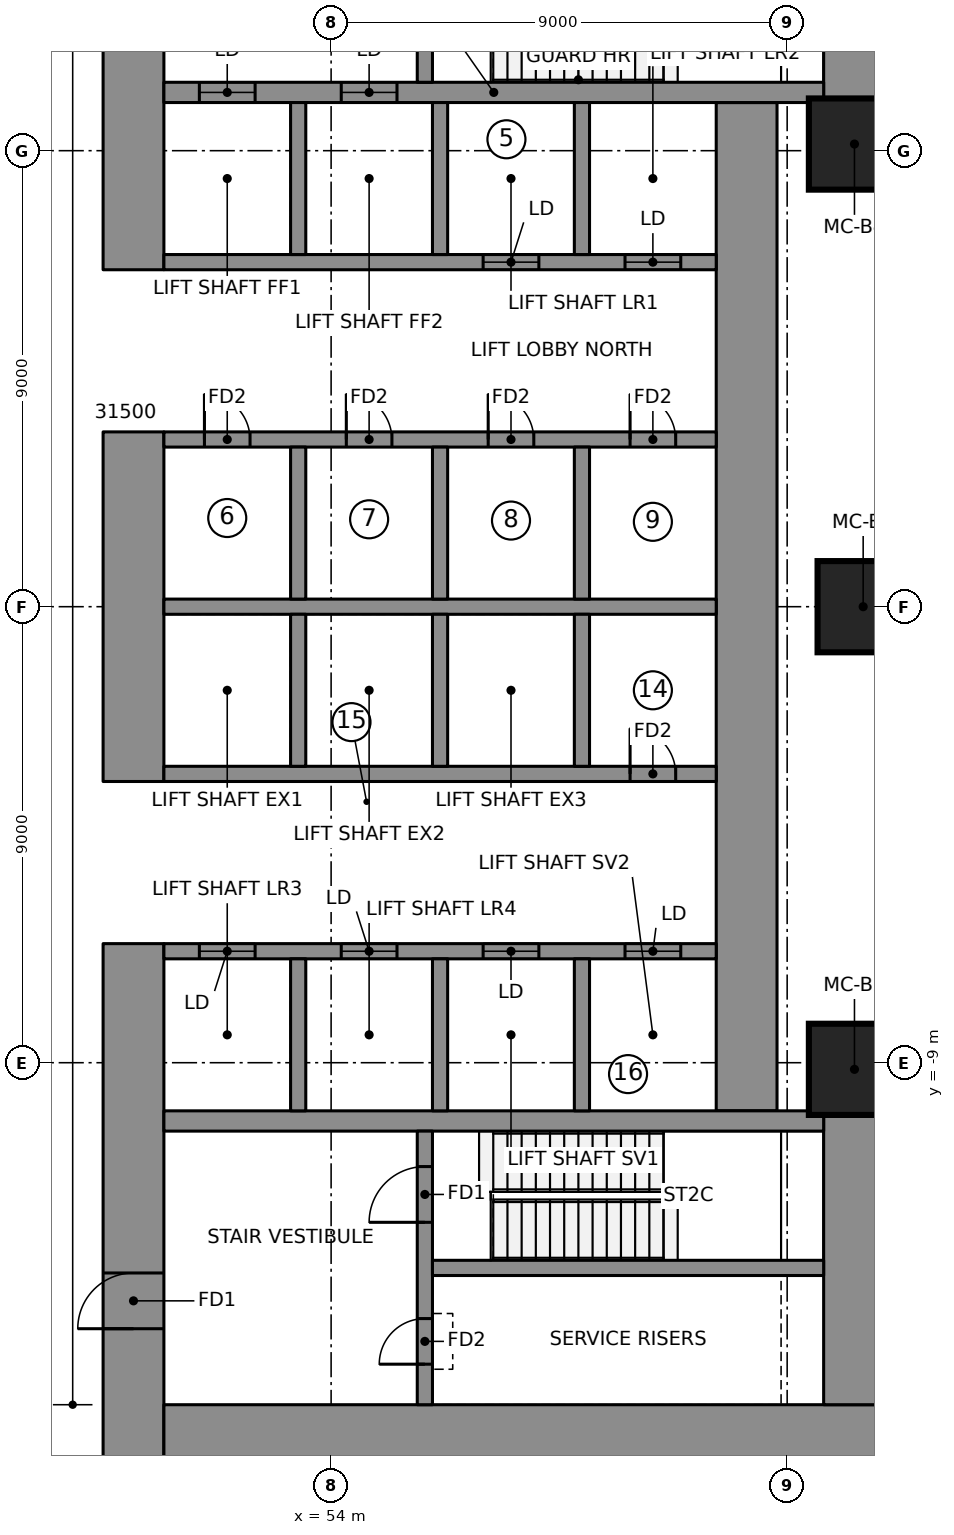
"""IFC4 building model, lengths in metres.
Left out: names, types, materials, properties, quantities, classifications, styles, units other than length and angle.
Written with IfcOpenShell. Run it as: python <this file> out.ifc"""

import sys

from ifc_helpers import new_model, si_unit, direction, frame, frame_2d, origin, origin_2d, place, context, subcontext, project, spatial, rectangle, extrude, element, fill, save


model = new_model("IFC4")
c1 = context("Model", 3, precision=1e-05, world=origin(), true_north=direction((0.0, 1.0)))
c2 = subcontext(c1, "Body", "Model", "MODEL_VIEW")
j1 = project(units=[si_unit("LENGTHUNIT", "METRE"), si_unit("PLANEANGLEUNIT", "RADIAN")], contexts=[c1])
p1 = place(None, origin())
s1 = spatial("IfcSite", under=j1, at=p1, CompositionType="ELEMENT")
p2 = place(p1, origin())
s2 = spatial("IfcBuilding", under=s1, at=p2, CompositionType="ELEMENT")
p3 = place(p2, frame((0.0, 0.0, 35.0)))
s3 = spatial("IfcBuildingStorey", under=s2, at=p3, CompositionType="ELEMENT", Elevation=35.0)
p4 = place(p3, frame((50.1, 6.65, 0.0), z_axis=(0.0, 0.0, 1.0), x_axis=(0.0, 1.0, 0.0)))
e1 = element("IfcWall", 1, at=p4, inside=s3, PredefinedType="SHEAR", context=c2, shape_type="SweptSolid", body=[
    extrude(rectangle(XDim=10.3, YDim=1.2, at=frame_2d((5.15, 0.0))), origin(), (0.0, 0.0, 1.0), 4.6),
])
p5 = place(p4, frame((6.5, 0.0, 0.0)))
e2 = element("IfcOpeningElement", 2, at=p5, cuts=e1, PredefinedType="OPENING", context=c2, shape_type="SweptSolid", body=[
    extrude(rectangle(XDim=1.1, YDim=2.1, at=frame_2d((0.55, 1.05))), frame((0.0, 0.61, 0.0), z_axis=(0.0, -1.0, 0.0), x_axis=(1.0, 0.0, 0.0)), (0.0, 0.0, 1.0), 1.22),
])
p6 = place(p3, frame((50.1, -3.45, 0.0), z_axis=(0.0, 0.0, 1.0), x_axis=(0.0, 1.0, 0.0)))
e3 = element("IfcWall", 3, at=p6, inside=s3, PredefinedType="SHEAR", context=c2, shape_type="SweptSolid", body=[
    extrude(rectangle(XDim=6.9, YDim=1.2, at=frame_2d((3.45, 0.0))), origin(), (0.0, 0.0, 1.0), 4.6),
])
p7 = place(p3, frame((50.1, -16.95, 0.0), z_axis=(0.0, 0.0, 1.0), x_axis=(0.0, 1.0, 0.0)))
e4 = element("IfcWall", 4, at=p7, inside=s3, PredefinedType="SHEAR", context=c2, shape_type="SweptSolid", body=[
    extrude(rectangle(XDim=10.3, YDim=1.2, at=frame_2d((5.15, 0.0))), origin(), (0.0, 0.0, 1.0), 4.6),
])
p8 = place(p7, frame((2.7, 0.0, 0.0)))
e5 = element("IfcOpeningElement", 5, at=p8, cuts=e4, PredefinedType="OPENING", context=c2, shape_type="SweptSolid", body=[
    extrude(rectangle(XDim=1.1, YDim=2.1, at=frame_2d((0.55, 1.05))), frame((0.0, 0.61, 0.0), z_axis=(0.0, -1.0, 0.0), x_axis=(1.0, 0.0, 0.0)), (0.0, 0.0, 1.0), 1.22),
])
p9 = place(p3, frame((50.7, -16.35, 0.0), z_axis=(0.0, 0.0, 1.0), x_axis=(1.0, 0.0, 0.0)))
e6 = element("IfcWall", 6, at=p9, inside=s3, PredefinedType="SHEAR", context=c2, shape_type="SweptSolid", body=[
    extrude(rectangle(XDim=14.22, YDim=1.2, at=frame_2d((7.11, 0.0))), origin(), (0.0, 0.0, 1.0), 4.6),
])
for number, where, z_axis, x_axis in (
    (7, (64.32, 9.95, 0.0), (0.0, 0.0, 1.0), (0.0, 1.0, 0.0)),
    (8, (64.32, -15.75, 0.0), (0.0, 0.0, 1.0), (0.0, 1.0, 0.0)),
):
    element("IfcWall", number, at=place(p3, frame(where, z_axis=z_axis, x_axis=x_axis)), inside=s3, PredefinedType="SHEAR", context=c2, shape_type="SweptSolid", body=[
        extrude(rectangle(XDim=5.8, YDim=1.2, at=frame_2d((2.9, 0.0))), origin(), (0.0, 0.0, 1.0), 4.6),
    ])
p10 = place(p3, frame((62.2, -9.95, 0.0), z_axis=(0.0, 0.0, 1.0), x_axis=(0.0, 1.0, 0.0)))
e9 = element("IfcWall", 9, at=p10, inside=s3, PredefinedType="SHEAR", context=c2, shape_type="SweptSolid", body=[
    extrude(rectangle(XDim=19.9, YDim=1.2, at=frame_2d((9.95, 0.0))), origin(), (0.0, 0.0, 1.0), 4.6),
])
p11 = place(p3, frame((50.7, 10.15, 0.0), z_axis=(0.0, 0.0, 1.0), x_axis=(1.0, 0.0, 0.0)))
e10 = element("IfcWall", 10, at=p11, inside=s3, PredefinedType="SHEAR", context=c2, shape_type="SweptSolid", body=[
    extrude(rectangle(XDim=13.02, YDim=0.4, at=frame_2d((6.51, 0.0))), origin(), (0.0, 0.0, 1.0), 4.6),
])
p12 = place(p11, frame((0.7, 0.0, 0.0)))
e11 = element("IfcOpeningElement", 11, at=p12, cuts=e10, PredefinedType="OPENING", context=c2, shape_type="SweptSolid", body=[
    extrude(rectangle(XDim=1.1, YDim=2.1, at=frame_2d((0.55, 1.05))), frame((0.0, 0.21, 0.0), z_axis=(0.0, -1.0, 0.0), x_axis=(1.0, 0.0, 0.0)), (0.0, 0.0, 1.0), 0.42),
])
p13 = place(p11, frame((3.5, 0.0, 0.0)))
e12 = element("IfcOpeningElement", 12, at=p13, cuts=e10, PredefinedType="OPENING", context=c2, shape_type="SweptSolid", body=[
    extrude(rectangle(XDim=1.1, YDim=2.1, at=frame_2d((0.55, 1.05))), frame((0.0, 0.21, 0.0), z_axis=(0.0, -1.0, 0.0), x_axis=(1.0, 0.0, 0.0)), (0.0, 0.0, 1.0), 0.42),
])
p14 = place(p3, frame((50.7, -10.15, 0.0), z_axis=(0.0, 0.0, 1.0), x_axis=(1.0, 0.0, 0.0)))
e13 = element("IfcWall", 13, at=p14, inside=s3, PredefinedType="SHEAR", context=c2, shape_type="SweptSolid", body=[
    extrude(rectangle(XDim=13.02, YDim=0.4, at=frame_2d((6.51, 0.0))), origin(), (0.0, 0.0, 1.0), 4.6),
])
p15 = place(p3, frame((50.7, 0.0, 0.0), z_axis=(0.0, 0.0, 1.0), x_axis=(1.0, 0.0, 0.0)))
e14 = element("IfcWall", 14, at=p15, inside=s3, PredefinedType="SHEAR", context=c2, shape_type="SweptSolid", body=[
    extrude(rectangle(XDim=10.9, YDim=0.3, at=frame_2d((5.45, 0.0))), origin(), (0.0, 0.0, 1.0), 4.6),
])
p16 = place(p3, frame((50.7, 3.3, 0.0), z_axis=(0.0, 0.0, 1.0), x_axis=(1.0, 0.0, 0.0)))
e15 = element("IfcWall", 15, at=p16, inside=s3, PredefinedType="SHEAR", context=c2, shape_type="SweptSolid", body=[
    extrude(rectangle(XDim=10.9, YDim=0.3, at=frame_2d((5.45, 0.0))), origin(), (0.0, 0.0, 1.0), 4.6),
])
p17 = place(p16, frame((0.8, 0.0, 0.0)))
e16 = element("IfcOpeningElement", 16, at=p17, cuts=e15, PredefinedType="OPENING", context=c2, shape_type="SweptSolid", body=[
    extrude(rectangle(XDim=0.9, YDim=2.1, at=frame_2d((0.45, 1.05))), frame((0.0, 0.16, 0.0), z_axis=(0.0, -1.0, 0.0), x_axis=(1.0, 0.0, 0.0)), (0.0, 0.0, 1.0), 0.32),
])
p18 = place(p16, frame((3.6, 0.0, 0.0)))
e17 = element("IfcOpeningElement", 17, at=p18, cuts=e15, PredefinedType="OPENING", context=c2, shape_type="SweptSolid", body=[
    extrude(rectangle(XDim=0.9, YDim=2.1, at=frame_2d((0.45, 1.05))), frame((0.0, 0.16, 0.0), z_axis=(0.0, -1.0, 0.0), x_axis=(1.0, 0.0, 0.0)), (0.0, 0.0, 1.0), 0.32),
])
p19 = place(p16, frame((6.4, 0.0, 0.0)))
e18 = element("IfcOpeningElement", 18, at=p19, cuts=e15, PredefinedType="OPENING", context=c2, shape_type="SweptSolid", body=[
    extrude(rectangle(XDim=0.9, YDim=2.1, at=frame_2d((0.45, 1.05))), frame((0.0, 0.16, 0.0), z_axis=(0.0, -1.0, 0.0), x_axis=(1.0, 0.0, 0.0)), (0.0, 0.0, 1.0), 0.32),
])
p20 = place(p16, frame((9.2, 0.0, 0.0)))
e19 = element("IfcOpeningElement", 19, at=p20, cuts=e15, PredefinedType="OPENING", context=c2, shape_type="SweptSolid", body=[
    extrude(rectangle(XDim=0.9, YDim=2.1, at=frame_2d((0.45, 1.05))), frame((0.0, 0.16, 0.0), z_axis=(0.0, -1.0, 0.0), x_axis=(1.0, 0.0, 0.0)), (0.0, 0.0, 1.0), 0.32),
])
p21 = place(p3, frame((50.7, 6.8, 0.0), z_axis=(0.0, 0.0, 1.0), x_axis=(1.0, 0.0, 0.0)))
e20 = element("IfcWall", 20, at=p21, inside=s3, PredefinedType="SHEAR", context=c2, shape_type="SweptSolid", body=[
    extrude(rectangle(XDim=10.9, YDim=0.3, at=frame_2d((5.45, 0.0))), origin(), (0.0, 0.0, 1.0), 4.6),
])
p22 = place(p21, frame((6.3, 0.0, 0.0)))
e21 = element("IfcOpeningElement", 21, at=p22, cuts=e20, PredefinedType="OPENING", context=c2, shape_type="SweptSolid", body=[
    extrude(rectangle(XDim=1.1, YDim=2.1, at=frame_2d((0.55, 1.05))), frame((0.0, 0.16, 0.0), z_axis=(0.0, -1.0, 0.0), x_axis=(1.0, 0.0, 0.0)), (0.0, 0.0, 1.0), 0.32),
])
p23 = place(p21, frame((9.1, 0.0, 0.0)))
e22 = element("IfcOpeningElement", 22, at=p23, cuts=e20, PredefinedType="OPENING", context=c2, shape_type="SweptSolid", body=[
    extrude(rectangle(XDim=1.1, YDim=2.1, at=frame_2d((0.55, 1.05))), frame((0.0, 0.16, 0.0), z_axis=(0.0, -1.0, 0.0), x_axis=(1.0, 0.0, 0.0)), (0.0, 0.0, 1.0), 0.32),
])
for number, where, z_axis, x_axis in (
    (23, (53.35, 0.15, 0.0), (0.0, 0.0, 1.0), (0.0, 1.0, 0.0)),
    (24, (53.35, 6.95, 0.0), (0.0, 0.0, 1.0), (0.0, 1.0, 0.0)),
    (25, (56.15, 0.15, 0.0), (0.0, 0.0, 1.0), (0.0, 1.0, 0.0)),
    (26, (56.15, 6.95, 0.0), (0.0, 0.0, 1.0), (0.0, 1.0, 0.0)),
    (27, (58.95, 0.15, 0.0), (0.0, 0.0, 1.0), (0.0, 1.0, 0.0)),
    (28, (58.95, 6.95, 0.0), (0.0, 0.0, 1.0), (0.0, 1.0, 0.0)),
):
    element("IfcWall", number, at=place(p3, frame(where, z_axis=z_axis, x_axis=x_axis)), inside=s3, PredefinedType="SHEAR", context=c2, shape_type="SweptSolid", body=[
        extrude(rectangle(XDim=3.0, YDim=0.3, at=frame_2d((1.5, 0.0))), origin(), (0.0, 0.0, 1.0), 4.6),
    ])
p24 = place(p3, frame((50.7, -3.3, 0.0), z_axis=(0.0, 0.0, 1.0), x_axis=(1.0, 0.0, 0.0)))
e29 = element("IfcWall", 29, at=p24, inside=s3, PredefinedType="SHEAR", context=c2, shape_type="SweptSolid", body=[
    extrude(rectangle(XDim=10.9, YDim=0.3, at=frame_2d((5.45, 0.0))), origin(), (0.0, 0.0, 1.0), 4.6),
])
p25 = place(p24, frame((9.2, 0.0, 0.0)))
e30 = element("IfcOpeningElement", 30, at=p25, cuts=e29, PredefinedType="OPENING", context=c2, shape_type="SweptSolid", body=[
    extrude(rectangle(XDim=0.9, YDim=2.1, at=frame_2d((0.45, 1.05))), frame((0.0, 0.16, 0.0), z_axis=(0.0, -1.0, 0.0), x_axis=(1.0, 0.0, 0.0)), (0.0, 0.0, 1.0), 0.32),
])
p26 = place(p3, frame((50.7, -6.8, 0.0), z_axis=(0.0, 0.0, 1.0), x_axis=(1.0, 0.0, 0.0)))
e31 = element("IfcWall", 31, at=p26, inside=s3, PredefinedType="SHEAR", context=c2, shape_type="SweptSolid", body=[
    extrude(rectangle(XDim=10.9, YDim=0.3, at=frame_2d((5.45, 0.0))), origin(), (0.0, 0.0, 1.0), 4.6),
])
p27 = place(p26, frame((0.7, 0.0, 0.0)))
e32 = element("IfcOpeningElement", 32, at=p27, cuts=e31, PredefinedType="OPENING", context=c2, shape_type="SweptSolid", body=[
    extrude(rectangle(XDim=1.1, YDim=2.1, at=frame_2d((0.55, 1.05))), frame((0.0, 0.16, 0.0), z_axis=(0.0, -1.0, 0.0), x_axis=(1.0, 0.0, 0.0)), (0.0, 0.0, 1.0), 0.32),
])
p28 = place(p26, frame((3.5, 0.0, 0.0)))
e33 = element("IfcOpeningElement", 33, at=p28, cuts=e31, PredefinedType="OPENING", context=c2, shape_type="SweptSolid", body=[
    extrude(rectangle(XDim=1.1, YDim=2.1, at=frame_2d((0.55, 1.05))), frame((0.0, 0.16, 0.0), z_axis=(0.0, -1.0, 0.0), x_axis=(1.0, 0.0, 0.0)), (0.0, 0.0, 1.0), 0.32),
])
p29 = place(p26, frame((6.3, 0.0, 0.0)))
e34 = element("IfcOpeningElement", 34, at=p29, cuts=e31, PredefinedType="OPENING", context=c2, shape_type="SweptSolid", body=[
    extrude(rectangle(XDim=1.1, YDim=2.1, at=frame_2d((0.55, 1.05))), frame((0.0, 0.16, 0.0), z_axis=(0.0, -1.0, 0.0), x_axis=(1.0, 0.0, 0.0)), (0.0, 0.0, 1.0), 0.32),
])
p30 = place(p26, frame((9.1, 0.0, 0.0)))
e35 = element("IfcOpeningElement", 35, at=p30, cuts=e31, PredefinedType="OPENING", context=c2, shape_type="SweptSolid", body=[
    extrude(rectangle(XDim=1.1, YDim=2.1, at=frame_2d((0.55, 1.05))), frame((0.0, 0.16, 0.0), z_axis=(0.0, -1.0, 0.0), x_axis=(1.0, 0.0, 0.0)), (0.0, 0.0, 1.0), 0.32),
])
for number, where, z_axis, x_axis in (
    (36, (53.35, -3.15, 0.0), (0.0, 0.0, 1.0), (0.0, 1.0, 0.0)),
    (37, (53.35, -9.95, 0.0), (0.0, 0.0, 1.0), (0.0, 1.0, 0.0)),
    (38, (56.15, -3.15, 0.0), (0.0, 0.0, 1.0), (0.0, 1.0, 0.0)),
    (39, (56.15, -9.95, 0.0), (0.0, 0.0, 1.0), (0.0, 1.0, 0.0)),
    (40, (58.95, -3.15, 0.0), (0.0, 0.0, 1.0), (0.0, 1.0, 0.0)),
    (41, (58.95, -9.95, 0.0), (0.0, 0.0, 1.0), (0.0, 1.0, 0.0)),
):
    element("IfcWall", number, at=place(p3, frame(where, z_axis=z_axis, x_axis=x_axis)), inside=s3, PredefinedType="SHEAR", context=c2, shape_type="SweptSolid", body=[
        extrude(rectangle(XDim=3.0, YDim=0.3, at=frame_2d((1.5, 0.0))), origin(), (0.0, 0.0, 1.0), 4.6),
    ])
p31 = place(p3, frame((55.85, 10.35, 0.0), z_axis=(0.0, 0.0, 1.0), x_axis=(0.0, 1.0, 0.0)))
e42 = element("IfcWall", 42, at=p31, inside=s3, PredefinedType="SHEAR", context=c2, shape_type="SweptSolid", body=[
    extrude(rectangle(XDim=5.4, YDim=0.3, at=frame_2d((2.7, 0.0))), origin(), (0.0, 0.0, 1.0), 4.6),
])
p32 = place(p31, frame((1.43, 0.0, 0.0)))
e43 = element("IfcOpeningElement", 43, at=p32, cuts=e42, PredefinedType="OPENING", context=c2, shape_type="SweptSolid", body=[
    extrude(rectangle(XDim=1.1, YDim=2.1, at=frame_2d((0.55, 1.05))), frame((0.0, 0.16, 0.0), z_axis=(0.0, -1.0, 0.0), x_axis=(1.0, 0.0, 0.0)), (0.0, 0.0, 1.0), 0.32),
])
p33 = place(p31, frame((3.6, 0.0, 0.0)))
e44 = element("IfcOpeningElement", 44, at=p33, cuts=e42, PredefinedType="OPENING", context=c2, shape_type="SweptSolid", body=[
    extrude(rectangle(XDim=1.1, YDim=2.1, at=frame_2d((0.55, 1.05))), frame((0.0, 0.16, 0.0), z_axis=(0.0, -1.0, 0.0), x_axis=(1.0, 0.0, 0.0)), (0.0, 0.0, 1.0), 0.32),
])
p34 = place(p3, frame((55.85, -15.75, 0.0), z_axis=(0.0, 0.0, 1.0), x_axis=(0.0, 1.0, 0.0)))
e45 = element("IfcWall", 45, at=p34, inside=s3, PredefinedType="SHEAR", context=c2, shape_type="SweptSolid", body=[
    extrude(rectangle(XDim=5.4, YDim=0.3, at=frame_2d((2.7, 0.0))), origin(), (0.0, 0.0, 1.0), 4.6),
])
p35 = place(p34, frame((3.6, 0.0, 0.0)))
e46 = element("IfcOpeningElement", 46, at=p35, cuts=e45, PredefinedType="OPENING", context=c2, shape_type="SweptSolid", body=[
    extrude(rectangle(XDim=1.1, YDim=2.1, at=frame_2d((0.55, 1.05))), frame((0.0, 0.16, 0.0), z_axis=(0.0, -1.0, 0.0), x_axis=(1.0, 0.0, 0.0)), (0.0, 0.0, 1.0), 0.32),
])
p36 = place(p34, frame((0.8, 0.0, 0.0)))
e47 = element("IfcOpeningElement", 47, at=p36, cuts=e45, PredefinedType="OPENING", context=c2, shape_type="SweptSolid", body=[
    extrude(rectangle(XDim=0.9, YDim=2.1, at=frame_2d((0.45, 1.05))), frame((0.0, 0.16, 0.0), z_axis=(0.0, -1.0, 0.0), x_axis=(1.0, 0.0, 0.0)), (0.0, 0.0, 1.0), 0.32),
])
p37 = place(p3, frame((56.0, -13.05, 0.0), z_axis=(0.0, 0.0, 1.0), x_axis=(1.0, 0.0, 0.0)))
e48 = element("IfcWall", 48, at=p37, inside=s3, PredefinedType="SHEAR", context=c2, shape_type="SweptSolid", body=[
    extrude(rectangle(XDim=7.72, YDim=0.3, at=frame_2d((3.86, 0.0))), origin(), (0.0, 0.0, 1.0), 4.6),
])
for number, where, z_axis, x_axis in (
    (49, (64.328, -9.131, 0.0), (0.0, 0.0, 1.0), (1.0, 0.0, 0.0)),
    (50, (64.5, 0.0, 0.0), (0.0, 0.0, 1.0), (1.0, 0.0, 0.0)),
    (51, (64.328, 9.131, 0.0), (0.0, 0.0, 1.0), (1.0, 0.0, 0.0)),
):
    element("IfcColumn", number, at=place(p3, frame(where, z_axis=z_axis, x_axis=x_axis)), inside=s3, PredefinedType="COLUMN", context=c2, shape_type="SweptSolid", body=[
        extrude(rectangle(XDim=1.8, YDim=1.8, at=origin_2d()), origin(), (0.0, 0.0, 1.0), 4.6),
    ])
p38 = place(p12, origin())
e52 = element("IfcDoor", 52, at=p38, inside=s3, OperationType="DOUBLE_DOOR_SLIDING", PredefinedType="DOOR", context=c2, shape_type="SweptSolid", body=[
    extrude(rectangle(XDim=1.1, YDim=2.1, at=frame_2d((0.55, 1.05))), frame((0.0, 0.025, 0.0), z_axis=(0.0, -1.0, 0.0), x_axis=(1.0, 0.0, 0.0)), (0.0, 0.0, 1.0), 0.05),
])
fill(e11, e52)
p39 = place(p13, origin())
e53 = element("IfcDoor", 53, at=p39, inside=s3, OperationType="DOUBLE_DOOR_SLIDING", PredefinedType="DOOR", context=c2, shape_type="SweptSolid", body=[
    extrude(rectangle(XDim=1.1, YDim=2.1, at=frame_2d((0.55, 1.05))), frame((0.0, 0.025, 0.0), z_axis=(0.0, -1.0, 0.0), x_axis=(1.0, 0.0, 0.0)), (0.0, 0.0, 1.0), 0.05),
])
fill(e12, e53)
p40 = place(p22, origin())
e54 = element("IfcDoor", 54, at=p40, inside=s3, OperationType="DOUBLE_DOOR_SLIDING", PredefinedType="DOOR", context=c2, shape_type="SweptSolid", body=[
    extrude(rectangle(XDim=1.1, YDim=2.1, at=frame_2d((0.55, 1.05))), frame((0.0, 0.025, 0.0), z_axis=(0.0, -1.0, 0.0), x_axis=(1.0, 0.0, 0.0)), (0.0, 0.0, 1.0), 0.05),
])
fill(e21, e54)
p41 = place(p23, origin())
e55 = element("IfcDoor", 55, at=p41, inside=s3, OperationType="DOUBLE_DOOR_SLIDING", PredefinedType="DOOR", context=c2, shape_type="SweptSolid", body=[
    extrude(rectangle(XDim=1.1, YDim=2.1, at=frame_2d((0.55, 1.05))), frame((0.0, 0.025, 0.0), z_axis=(0.0, -1.0, 0.0), x_axis=(1.0, 0.0, 0.0)), (0.0, 0.0, 1.0), 0.05),
])
fill(e22, e55)
p42 = place(p27, origin())
e56 = element("IfcDoor", 56, at=p42, inside=s3, OperationType="DOUBLE_DOOR_SLIDING", PredefinedType="DOOR", context=c2, shape_type="SweptSolid", body=[
    extrude(rectangle(XDim=1.1, YDim=2.1, at=frame_2d((0.55, 1.05))), frame((0.0, 0.025, 0.0), z_axis=(0.0, -1.0, 0.0), x_axis=(1.0, 0.0, 0.0)), (0.0, 0.0, 1.0), 0.05),
])
fill(e32, e56)
p43 = place(p28, origin())
e57 = element("IfcDoor", 57, at=p43, inside=s3, OperationType="DOUBLE_DOOR_SLIDING", PredefinedType="DOOR", context=c2, shape_type="SweptSolid", body=[
    extrude(rectangle(XDim=1.1, YDim=2.1, at=frame_2d((0.55, 1.05))), frame((0.0, 0.025, 0.0), z_axis=(0.0, -1.0, 0.0), x_axis=(1.0, 0.0, 0.0)), (0.0, 0.0, 1.0), 0.05),
])
fill(e33, e57)
p44 = place(p29, origin())
e58 = element("IfcDoor", 58, at=p44, inside=s3, OperationType="DOUBLE_DOOR_SLIDING", PredefinedType="DOOR", context=c2, shape_type="SweptSolid", body=[
    extrude(rectangle(XDim=1.1, YDim=2.1, at=frame_2d((0.55, 1.05))), frame((0.0, 0.025, 0.0), z_axis=(0.0, -1.0, 0.0), x_axis=(1.0, 0.0, 0.0)), (0.0, 0.0, 1.0), 0.05),
])
fill(e34, e58)
p45 = place(p30, origin())
e59 = element("IfcDoor", 59, at=p45, inside=s3, OperationType="DOUBLE_DOOR_SLIDING", PredefinedType="DOOR", context=c2, shape_type="SweptSolid", body=[
    extrude(rectangle(XDim=1.1, YDim=2.1, at=frame_2d((0.55, 1.05))), frame((0.0, 0.025, 0.0), z_axis=(0.0, -1.0, 0.0), x_axis=(1.0, 0.0, 0.0)), (0.0, 0.0, 1.0), 0.05),
])
fill(e35, e59)
p46 = place(p35, origin())
e60 = element("IfcDoor", 60, at=p46, inside=s3, OperationType="SINGLE_SWING_RIGHT", PredefinedType="DOOR", context=c2, shape_type="SweptSolid", body=[
    extrude(rectangle(XDim=1.1, YDim=2.1, at=frame_2d((0.55, 1.05))), frame((0.0, 0.025, 0.0), z_axis=(0.0, -1.0, 0.0), x_axis=(1.0, 0.0, 0.0)), (0.0, 0.0, 1.0), 0.05),
])
fill(e46, e60)
p47 = place(p8, origin())
e61 = element("IfcDoor", 61, at=p47, inside=s3, OperationType="SINGLE_SWING_RIGHT", PredefinedType="DOOR", context=c2, shape_type="SweptSolid", body=[
    extrude(rectangle(XDim=1.1, YDim=2.1, at=frame_2d((0.55, 1.05))), frame((0.0, 0.025, 0.0), z_axis=(0.0, -1.0, 0.0), x_axis=(1.0, 0.0, 0.0)), (0.0, 0.0, 1.0), 0.05),
])
fill(e5, e61)
p48 = place(p36, origin())
e62 = element("IfcDoor", 62, at=p48, inside=s3, OperationType="SINGLE_SWING_LEFT", PredefinedType="DOOR", context=c2, shape_type="SweptSolid", body=[
    extrude(rectangle(XDim=0.9, YDim=2.1, at=frame_2d((0.45, 1.05))), frame((0.0, 0.025, 0.0), z_axis=(0.0, -1.0, 0.0), x_axis=(1.0, 0.0, 0.0)), (0.0, 0.0, 1.0), 0.05),
])
fill(e47, e62)
p49 = place(p17, origin())
e63 = element("IfcDoor", 63, at=p49, inside=s3, OperationType="SINGLE_SWING_LEFT", PredefinedType="DOOR", context=c2, shape_type="SweptSolid", body=[
    extrude(rectangle(XDim=0.9, YDim=2.1, at=frame_2d((0.45, 1.05))), frame((0.0, 0.025, 0.0), z_axis=(0.0, -1.0, 0.0), x_axis=(1.0, 0.0, 0.0)), (0.0, 0.0, 1.0), 0.05),
])
fill(e16, e63)
p50 = place(p18, origin())
e64 = element("IfcDoor", 64, at=p50, inside=s3, OperationType="SINGLE_SWING_LEFT", PredefinedType="DOOR", context=c2, shape_type="SweptSolid", body=[
    extrude(rectangle(XDim=0.9, YDim=2.1, at=frame_2d((0.45, 1.05))), frame((0.0, 0.025, 0.0), z_axis=(0.0, -1.0, 0.0), x_axis=(1.0, 0.0, 0.0)), (0.0, 0.0, 1.0), 0.05),
])
fill(e17, e64)
p51 = place(p19, origin())
e65 = element("IfcDoor", 65, at=p51, inside=s3, OperationType="SINGLE_SWING_LEFT", PredefinedType="DOOR", context=c2, shape_type="SweptSolid", body=[
    extrude(rectangle(XDim=0.9, YDim=2.1, at=frame_2d((0.45, 1.05))), frame((0.0, 0.025, 0.0), z_axis=(0.0, -1.0, 0.0), x_axis=(1.0, 0.0, 0.0)), (0.0, 0.0, 1.0), 0.05),
])
fill(e18, e65)
p52 = place(p20, origin())
e66 = element("IfcDoor", 66, at=p52, inside=s3, OperationType="SINGLE_SWING_LEFT", PredefinedType="DOOR", context=c2, shape_type="SweptSolid", body=[
    extrude(rectangle(XDim=0.9, YDim=2.1, at=frame_2d((0.45, 1.05))), frame((0.0, 0.025, 0.0), z_axis=(0.0, -1.0, 0.0), x_axis=(1.0, 0.0, 0.0)), (0.0, 0.0, 1.0), 0.05),
])
fill(e19, e66)
p53 = place(p25, origin())
e67 = element("IfcDoor", 67, at=p53, inside=s3, OperationType="SINGLE_SWING_LEFT", PredefinedType="DOOR", context=c2, shape_type="SweptSolid", body=[
    extrude(rectangle(XDim=0.9, YDim=2.1, at=frame_2d((0.45, 1.05))), frame((0.0, 0.025, 0.0), z_axis=(0.0, -1.0, 0.0), x_axis=(1.0, 0.0, 0.0)), (0.0, 0.0, 1.0), 0.05),
])
fill(e30, e67)
save(model, sys.argv[1])
